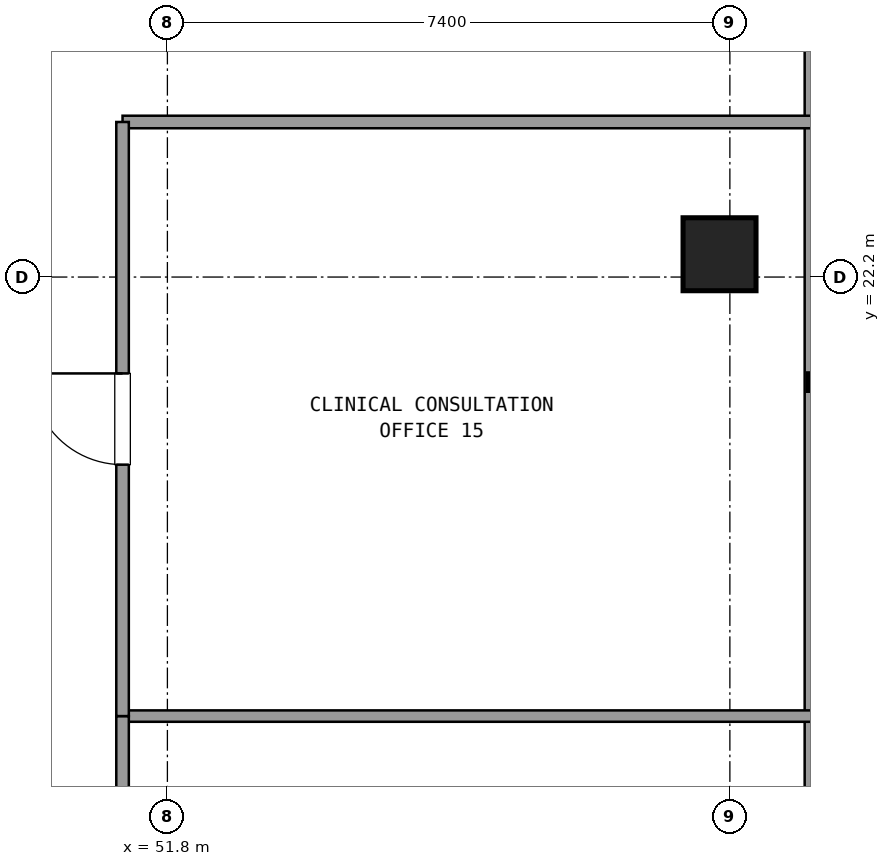
"""IFC4 building model, lengths in metres.
Left out: names, types, materials, properties, quantities, classifications, styles, units other than length and angle.
Written with IfcOpenShell. Run it as: python <this file> out.ifc"""

import sys

from ifc_helpers import new_model, si_unit, direction, frame, frame_2d, origin, origin_2d, place, context, subcontext, project, spatial, rectangle, extrude, element, fill, save


model = new_model("IFC4")
c1 = context("Model", 3, precision=1e-05, world=origin(), true_north=direction((0.0, 1.0)))
c2 = subcontext(c1, "Body", "Model", "MODEL_VIEW")
j1 = project(units=[si_unit("LENGTHUNIT", "METRE"), si_unit("PLANEANGLEUNIT", "RADIAN")], contexts=[c1])
p1 = place(None, origin())
s1 = spatial("IfcSite", under=j1, at=p1, CompositionType="ELEMENT")
p2 = place(p1, origin())
s2 = spatial("IfcBuilding", under=s1, at=p2, CompositionType="ELEMENT")
p3 = place(p2, frame((0.0, 0.0, 134.82)))
s3 = spatial("IfcBuildingStorey", under=s2, at=p3, CompositionType="ELEMENT", Elevation=134.82)
p4 = place(p3, frame((59.064, 22.5, 0.0), z_axis=(0.0, 0.0, 1.0), x_axis=(1.0, 0.0, 0.0)))
e1 = element("IfcColumn", 1, at=p4, inside=s3, PredefinedType="COLUMN", context=c2, shape_type="SweptSolid", body=[
    extrude(rectangle(XDim=0.96, YDim=0.96, at=origin_2d()), origin(), (0.0, 0.0, 1.0), 3.6),
])
p5 = place(p3, frame((60.304, 10.655, 0.0), z_axis=(0.0, 0.0, 1.0), x_axis=(0.0, 1.0, 0.0)))
e2 = element("IfcWall", 2, at=p5, inside=s3, PredefinedType="SOLIDWALL", context=c2, shape_type="SweptSolid", body=[
    extrude(rectangle(XDim=30.49, YDim=0.24, at=frame_2d((15.245, 0.0))), origin(), (0.0, 0.0, 1.0), 0.85),
])
p6 = place(p3, frame((51.21, 24.24, 0.0), z_axis=(0.0, 0.0, 1.0), x_axis=(1.0, 0.0, 0.0)))
e3 = element("IfcWall", 3, at=p6, inside=s3, PredefinedType="PARTITIONING", context=c2, shape_type="SweptSolid", body=[
    extrude(rectangle(XDim=9.074, YDim=0.165, at=frame_2d((4.537, 0.0))), origin(), (0.0, 0.0, 1.0), 2.61),
])
p7 = place(p3, frame((51.21, 16.424, 0.0), z_axis=(0.0, 0.0, 1.0), x_axis=(1.0, 0.0, 0.0)))
e4 = element("IfcWall", 4, at=p7, inside=s3, PredefinedType="PARTITIONING", context=c2, shape_type="SweptSolid", body=[
    extrude(rectangle(XDim=9.074, YDim=0.15, at=frame_2d((4.537, 0.0))), origin(), (0.0, 0.0, 1.0), 2.61),
])
p8 = place(p3, frame((51.21, 4.7, 0.0), z_axis=(0.0, 0.0, 1.0), x_axis=(0.0, 1.0, 0.0)))
e5 = element("IfcWall", 5, at=p8, inside=s3, PredefinedType="PARTITIONING", context=c2, shape_type="SweptSolid", body=[
    extrude(rectangle(XDim=11.724, YDim=0.165, at=frame_2d((5.862, 0.0))), origin(), (0.0, 0.0, 1.0), 2.61),
])
p9 = place(p8, frame((5.262, 0.0, 0.0)))
e6 = element("IfcOpeningElement", 6, at=p9, cuts=e5, PredefinedType="OPENING", context=c2, shape_type="SweptSolid", body=[
    extrude(rectangle(XDim=1.2, YDim=2.15, at=frame_2d((0.6, 1.075))), frame((0.0, 0.093, 0.0), z_axis=(0.0, -1.0, 0.0), x_axis=(1.0, 0.0, 0.0)), (0.0, 0.0, 1.0), 0.185),
])
p10 = place(p3, frame((51.21, 16.424, 0.0), z_axis=(0.0, 0.0, 1.0), x_axis=(0.0, 1.0, 0.0)))
e7 = element("IfcWall", 7, at=p10, inside=s3, PredefinedType="PARTITIONING", context=c2, shape_type="SweptSolid", body=[
    extrude(rectangle(XDim=7.816, YDim=0.165, at=frame_2d((3.908, 0.0))), origin(), (0.0, 0.0, 1.0), 2.61),
])
p11 = place(p10, frame((3.308, 0.0, 0.0)))
e8 = element("IfcOpeningElement", 8, at=p11, cuts=e7, PredefinedType="OPENING", context=c2, shape_type="SweptSolid", body=[
    extrude(rectangle(XDim=1.2, YDim=2.15, at=frame_2d((0.6, 1.075))), frame((0.0, 0.093, 0.0), z_axis=(0.0, -1.0, 0.0), x_axis=(1.0, 0.0, 0.0)), (0.0, 0.0, 1.0), 0.185),
])
p12 = place(p11, origin())
e9 = element("IfcDoor", 9, at=p12, inside=s3, OperationType="SINGLE_SWING_RIGHT", PredefinedType="DOOR", context=c2, shape_type="SweptSolid", body=[
    extrude(rectangle(XDim=1.2, YDim=2.15, at=frame_2d((0.6, 1.075))), frame((0.0, 0.025, 0.0), z_axis=(0.0, -1.0, 0.0), x_axis=(1.0, 0.0, 0.0)), (0.0, 0.0, 1.0), 0.05),
])
fill(e8, e9)
save(model, sys.argv[1])
